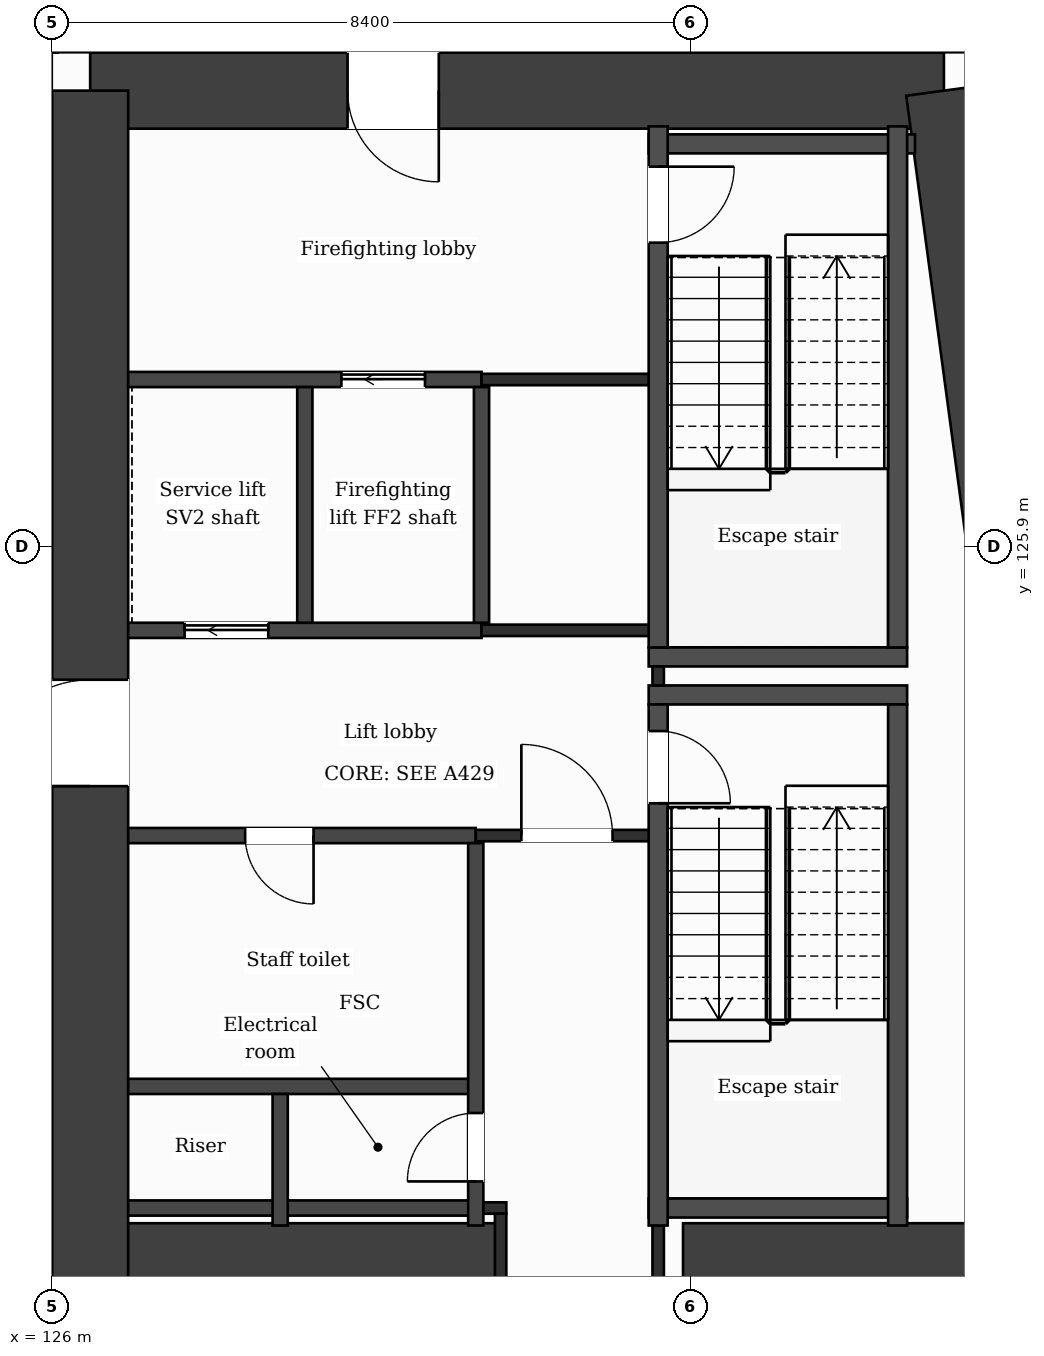
"""IFC4 building model, lengths in metres.
Left out: names, types, materials, properties, quantities, classifications, styles, units other than length and angle.
Written with IfcOpenShell. Run it as: python <this file> out.ifc"""

import sys

from ifc_helpers import new_model, si_unit, direction, frame, frame_2d, origin, place, context, subcontext, project, spatial, rectangle, extrude, element, fill, save


model = new_model("IFC4")
c1 = context("Model", 3, precision=1e-05, world=origin(), true_north=direction((0.0, 1.0)))
c2 = subcontext(c1, "Body", "Model", "MODEL_VIEW")
j1 = project(units=[si_unit("LENGTHUNIT", "METRE"), si_unit("PLANEANGLEUNIT", "RADIAN")], contexts=[c1])
p1 = place(None, origin())
s1 = spatial("IfcSite", under=j1, at=p1, CompositionType="ELEMENT")
p2 = place(p1, origin())
s2 = spatial("IfcBuilding", under=s1, at=p2, CompositionType="ELEMENT")
p3 = place(p2, frame((0.0, 0.0, 120.6)))
s3 = spatial("IfcBuildingStorey", under=s2, at=p3, CompositionType="ELEMENT", Elevation=120.6)
p4 = place(p3, frame((126.5, 131.9, 0.0), z_axis=(0.0, 0.0, 1.0), x_axis=(1.0, 0.0, 0.0)))
e1 = element("IfcWall", 1, at=p4, inside=s3, PredefinedType="SHEAR", context=c2, shape_type="SweptSolid", body=[
    extrude(rectangle(XDim=11.232, YDim=1.0, at=frame_2d((5.616, 0.0))), origin(), (0.0, 0.0, 1.0), 3.7),
])
p5 = place(p4, frame((3.386, 0.0, 0.0)))
e2 = element("IfcOpeningElement", 2, at=p5, cuts=e1, PredefinedType="OPENING", context=c2, shape_type="SweptSolid", body=[
    extrude(rectangle(XDim=1.2, YDim=2.1, at=frame_2d((0.6, 1.05))), frame((0.0, 0.51, 0.0), z_axis=(0.0, -1.0, 0.0), x_axis=(1.0, 0.0, 0.0)), (0.0, 0.0, 1.0), 1.02),
])
p6 = place(p3, frame((137.732, 131.9, 0.0), z_axis=(0.0, 0.0, 1.0), x_axis=(0.133411141623, -0.991060778808, 0.0)))
e3 = element("IfcWall", 3, at=p6, inside=s3, PredefinedType="SHEAR", context=c2, shape_type="SweptSolid", body=[
    extrude(rectangle(XDim=21.189, YDim=1.0, at=frame_2d((10.595, 0.0))), origin(), (0.0, 0.0, 1.0), 3.7),
])
p7 = place(p3, frame((126.5, 110.9, 0.0), z_axis=(0.0, 0.0, 1.0), x_axis=(0.0, 1.0, 0.0)))
e4 = element("IfcWall", 4, at=p7, inside=s3, PredefinedType="SHEAR", context=c2, shape_type="SweptSolid", body=[
    extrude(rectangle(XDim=21.0, YDim=1.0, at=frame_2d((10.5, 0.0))), origin(), (0.0, 0.0, 1.0), 3.7),
])
p8 = place(p7, frame((11.85, 0.0, 0.0)))
e5 = element("IfcOpeningElement", 5, at=p8, cuts=e4, PredefinedType="OPENING", context=c2, shape_type="SweptSolid", body=[
    extrude(rectangle(XDim=1.4, YDim=2.1, at=frame_2d((0.7, 1.05))), frame((0.0, 0.51, 0.0), z_axis=(0.0, -1.0, 0.0), x_axis=(1.0, 0.0, 0.0)), (0.0, 0.0, 1.0), 1.02),
])
p9 = place(p3, frame((127.0, 116.5, 0.0), z_axis=(0.0, 0.0, 1.0), x_axis=(1.0, 0.0, 0.0)))
e6 = element("IfcWall", 6, at=p9, inside=s3, PredefinedType="SHEAR", context=c2, shape_type="SweptSolid", body=[
    extrude(rectangle(XDim=4.9, YDim=1.0, at=frame_2d((2.45, 0.0))), origin(), (0.0, 0.0, 1.0), 3.7),
])
p10 = place(p3, frame((134.3, 116.5, 0.0), z_axis=(0.0, 0.0, 1.0), x_axis=(1.0, 0.0, 0.0)))
e7 = element("IfcWall", 7, at=p10, inside=s3, PredefinedType="SHEAR", context=c2, shape_type="SweptSolid", body=[
    extrude(rectangle(XDim=5.077, YDim=1.0, at=frame_2d((2.539, 0.0))), origin(), (0.0, 0.0, 1.0), 3.7),
])
p11 = place(p3, frame((136.504, 132.4, 0.0), z_axis=(0.0, 0.0, 1.0), x_axis=(-0.133399697462, 0.99106231929, 0.0)))
e8 = element("IfcWall", 8, at=p11, inside=s3, PredefinedType="SOLIDWALL", context=c2, shape_type="SweptSolid", body=[
    extrude(rectangle(XDim=6.74, YDim=0.3, at=frame_2d((3.37, 0.0))), origin(), (0.0, 0.0, 1.0), 3.38),
])
p12 = place(p11, frame((1.115, 0.0, 0.0)))
e9 = element("IfcOpeningElement", 9, at=p12, cuts=e8, PredefinedType="OPENING", context=c2, shape_type="SweptSolid", body=[
    extrude(rectangle(XDim=1.2, YDim=2.4, at=frame_2d((0.6, 1.2))), frame((0.0, 0.16, 0.0), z_axis=(0.0, -1.0, 0.0), x_axis=(1.0, 0.0, 0.0)), (0.0, 0.0, 1.0), 0.32),
])
p13 = place(p11, frame((3.835, 0.0, 0.9)))
e10 = element("IfcOpeningElement", 10, at=p13, cuts=e8, PredefinedType="OPENING", context=c2, shape_type="SweptSolid", body=[
    extrude(rectangle(XDim=2.4, YDim=2.1, at=frame_2d((1.2, 1.05))), frame((0.0, 0.16, 0.0), z_axis=(0.0, -1.0, 0.0), x_axis=(1.0, 0.0, 0.0)), (0.0, 0.0, 1.0), 0.32),
])
p14 = place(p3, frame((127.0, 117.2, 0.0), z_axis=(0.0, 0.0, 1.0), x_axis=(1.0, 0.0, 0.0)))
e11 = element("IfcWall", 11, at=p14, inside=s3, PredefinedType="PARTITIONING", context=c2, shape_type="SweptSolid", body=[
    extrude(rectangle(XDim=4.573, YDim=0.2, at=frame_2d((2.287, 0.0))), origin(), (0.0, 0.0, 1.0), 3.38),
])
p15 = place(p3, frame((131.573, 117.2, 0.0), z_axis=(0.0, 0.0, 1.0), x_axis=(1.0, 0.0, 0.0)))
e12 = element("IfcWall", 12, at=p15, inside=s3, PredefinedType="PARTITIONING", context=c2, shape_type="SweptSolid", body=[
    extrude(rectangle(XDim=0.402, YDim=0.15, at=frame_2d((0.201, 0.0))), origin(), (0.0, 0.0, 1.0), 3.38),
])
p16 = place(p3, frame((133.848, 117.2, 0.0), z_axis=(0.0, 0.0, 1.0), x_axis=(1.0, 0.0, 0.0)))
e13 = element("IfcWall", 13, at=p16, inside=s3, PredefinedType="PARTITIONING", context=c2, shape_type="SweptSolid", body=[
    extrude(rectangle(XDim=3.4, YDim=0.25, at=frame_2d((1.7, 0.0))), origin(), (0.0, 0.0, 1.0), 3.38),
])
p17 = place(p3, frame((127.0, 118.8, 0.0), z_axis=(0.0, 0.0, 1.0), x_axis=(1.0, 0.0, 0.0)))
e14 = element("IfcWall", 14, at=p17, inside=s3, PredefinedType="PARTITIONING", context=c2, shape_type="SweptSolid", body=[
    extrude(rectangle(XDim=4.573, YDim=0.2, at=frame_2d((2.287, 0.0))), origin(), (0.0, 0.0, 1.0), 3.38),
])
p18 = place(p3, frame((127.0, 122.1, 0.0), z_axis=(0.0, 0.0, 1.0), x_axis=(1.0, 0.0, 0.0)))
e15 = element("IfcWall", 15, at=p18, inside=s3, PredefinedType="PARTITIONING", context=c2, shape_type="SweptSolid", body=[
    extrude(rectangle(XDim=4.573, YDim=0.2, at=frame_2d((2.287, 0.0))), origin(), (0.0, 0.0, 1.0), 3.38),
])
p19 = place(p18, frame((1.539, 0.0, 0.0)))
e16 = element("IfcOpeningElement", 16, at=p19, cuts=e15, PredefinedType="OPENING", context=c2, shape_type="SweptSolid", body=[
    extrude(rectangle(XDim=0.9, YDim=2.1, at=frame_2d((0.45, 1.05))), frame((0.0, 0.11, 0.0), z_axis=(0.0, -1.0, 0.0), x_axis=(1.0, 0.0, 0.0)), (0.0, 0.0, 1.0), 0.22),
])
p20 = place(p3, frame((131.573, 122.1, 0.0), z_axis=(0.0, 0.0, 1.0), x_axis=(1.0, 0.0, 0.0)))
e17 = element("IfcWall", 17, at=p20, inside=s3, PredefinedType="PARTITIONING", context=c2, shape_type="SweptSolid", body=[
    extrude(rectangle(XDim=2.4, YDim=0.15, at=frame_2d((1.2, 0.0))), origin(), (0.0, 0.0, 1.0), 3.38),
])
p21 = place(p20, frame((0.6, 0.0, 0.0)))
e18 = element("IfcOpeningElement", 18, at=p21, cuts=e17, PredefinedType="OPENING", context=c2, shape_type="SweptSolid", body=[
    extrude(rectangle(XDim=1.2, YDim=2.1, at=frame_2d((0.6, 1.05))), frame((0.0, 0.085, 0.0), z_axis=(0.0, -1.0, 0.0), x_axis=(1.0, 0.0, 0.0)), (0.0, 0.0, 1.0), 0.17),
])
p22 = place(p3, frame((100.8, 122.45, 0.0), z_axis=(0.0, 0.0, 1.0), x_axis=(1.0, 0.0, 0.0)))
e19 = element("IfcWall", 19, at=p22, inside=s3, PredefinedType="PARTITIONING", context=c2, shape_type="SweptSolid", body=[
    extrude(rectangle(XDim=25.2, YDim=0.15, at=frame_2d((12.6, 0.0))), origin(), (0.0, 0.0, 1.0), 3.38),
])
for number, where, z_axis, x_axis in (
    (20, (133.848, 123.95, 0.0), (0.0, 0.0, 1.0), (1.0, 0.0, 0.0)),
    (21, (133.848, 124.45, 0.0), (0.0, 0.0, 1.0), (1.0, 0.0, 0.0)),
):
    element("IfcWall", number, at=place(p3, frame(where, z_axis=z_axis, x_axis=x_axis)), inside=s3, PredefinedType="PARTITIONING", context=c2, shape_type="SweptSolid", body=[
        extrude(rectangle(XDim=3.4, YDim=0.25, at=frame_2d((1.7, 0.0))), origin(), (0.0, 0.0, 1.0), 3.38),
    ])
p23 = place(p3, frame((100.8, 124.45, 0.0), z_axis=(0.0, 0.0, 1.0), x_axis=(1.0, 0.0, 0.0)))
e22 = element("IfcWall", 22, at=p23, inside=s3, PredefinedType="PARTITIONING", context=c2, shape_type="SweptSolid", body=[
    extrude(rectangle(XDim=25.2, YDim=0.15, at=frame_2d((12.6, 0.0))), origin(), (0.0, 0.0, 1.0), 3.38),
])
p24 = place(p23, frame((1.85, 0.0, 0.0)))
e23 = element("IfcOpeningElement", 23, at=p24, cuts=e22, PredefinedType="OPENING", context=c2, shape_type="SweptSolid", body=[
    extrude(rectangle(XDim=1.0, YDim=2.1, at=frame_2d((0.5, 1.05))), frame((0.0, 0.085, 0.0), z_axis=(0.0, -1.0, 0.0), x_axis=(1.0, 0.0, 0.0)), (0.0, 0.0, 1.0), 0.17),
])
p25 = place(p23, frame((6.425, 0.0, 0.0)))
e24 = element("IfcOpeningElement", 24, at=p25, cuts=e22, PredefinedType="OPENING", context=c2, shape_type="SweptSolid", body=[
    extrude(rectangle(XDim=1.0, YDim=2.1, at=frame_2d((0.5, 1.05))), frame((0.0, 0.085, 0.0), z_axis=(0.0, -1.0, 0.0), x_axis=(1.0, 0.0, 0.0)), (0.0, 0.0, 1.0), 0.17),
])
p26 = place(p23, frame((12.77, 0.0, 0.0)))
e25 = element("IfcOpeningElement", 25, at=p26, cuts=e22, PredefinedType="OPENING", context=c2, shape_type="SweptSolid", body=[
    extrude(rectangle(XDim=1.0, YDim=2.1, at=frame_2d((0.5, 1.05))), frame((0.0, 0.085, 0.0), z_axis=(0.0, -1.0, 0.0), x_axis=(1.0, 0.0, 0.0)), (0.0, 0.0, 1.0), 0.17),
])
p27 = place(p23, frame((17.8, 0.0, 0.0)))
e26 = element("IfcOpeningElement", 26, at=p27, cuts=e22, PredefinedType="OPENING", context=c2, shape_type="SweptSolid", body=[
    extrude(rectangle(XDim=1.0, YDim=2.1, at=frame_2d((0.5, 1.05))), frame((0.0, 0.085, 0.0), z_axis=(0.0, -1.0, 0.0), x_axis=(1.0, 0.0, 0.0)), (0.0, 0.0, 1.0), 0.17),
])
p28 = place(p23, frame((22.85, 0.0, 0.0)))
e27 = element("IfcOpeningElement", 27, at=p28, cuts=e22, PredefinedType="OPENING", context=c2, shape_type="SweptSolid", body=[
    extrude(rectangle(XDim=1.0, YDim=2.1, at=frame_2d((0.5, 1.05))), frame((0.0, 0.085, 0.0), z_axis=(0.0, -1.0, 0.0), x_axis=(1.0, 0.0, 0.0)), (0.0, 0.0, 1.0), 0.17),
])
p29 = place(p3, frame((127.0, 124.8, 0.0), z_axis=(0.0, 0.0, 1.0), x_axis=(1.0, 0.0, 0.0)))
e28 = element("IfcWall", 28, at=p29, inside=s3, PredefinedType="PARTITIONING", context=c2, shape_type="SweptSolid", body=[
    extrude(rectangle(XDim=4.649, YDim=0.2, at=frame_2d((2.324, 0.0))), origin(), (0.0, 0.0, 1.0), 3.38),
])
p30 = place(p29, frame((0.743, 0.0, 0.0)))
e29 = element("IfcOpeningElement", 29, at=p30, cuts=e28, PredefinedType="OPENING", context=c2, shape_type="SweptSolid", body=[
    extrude(rectangle(XDim=1.1, YDim=2.1, at=frame_2d((0.55, 1.05))), frame((0.0, 0.11, 0.0), z_axis=(0.0, -1.0, 0.0), x_axis=(1.0, 0.0, 0.0)), (0.0, 0.0, 1.0), 0.22),
])
p31 = place(p3, frame((131.649, 124.8, 0.0), z_axis=(0.0, 0.0, 1.0), x_axis=(1.0, 0.0, 0.0)))
e30 = element("IfcWall", 30, at=p31, inside=s3, PredefinedType="PARTITIONING", context=c2, shape_type="SweptSolid", body=[
    extrude(rectangle(XDim=2.449, YDim=0.15, at=frame_2d((1.225, 0.0))), origin(), (0.0, 0.0, 1.0), 3.38),
])
p32 = place(p3, frame((127.0, 128.1, 0.0), z_axis=(0.0, 0.0, 1.0), x_axis=(1.0, 0.0, 0.0)))
e31 = element("IfcWall", 31, at=p32, inside=s3, PredefinedType="PARTITIONING", context=c2, shape_type="SweptSolid", body=[
    extrude(rectangle(XDim=4.649, YDim=0.2, at=frame_2d((2.324, 0.0))), origin(), (0.0, 0.0, 1.0), 3.38),
])
p33 = place(p32, frame((2.805, 0.0, 0.0)))
e32 = element("IfcOpeningElement", 32, at=p33, cuts=e31, PredefinedType="OPENING", context=c2, shape_type="SweptSolid", body=[
    extrude(rectangle(XDim=1.1, YDim=2.1, at=frame_2d((0.55, 1.05))), frame((0.0, 0.11, 0.0), z_axis=(0.0, -1.0, 0.0), x_axis=(1.0, 0.0, 0.0)), (0.0, 0.0, 1.0), 0.22),
])
p34 = place(p3, frame((131.649, 128.1, 0.0), z_axis=(0.0, 0.0, 1.0), x_axis=(1.0, 0.0, 0.0)))
e33 = element("IfcWall", 33, at=p34, inside=s3, PredefinedType="PARTITIONING", context=c2, shape_type="SweptSolid", body=[
    extrude(rectangle(XDim=2.324, YDim=0.15, at=frame_2d((1.162, 0.0))), origin(), (0.0, 0.0, 1.0), 3.38),
])
p35 = place(p3, frame((133.848, 131.2, 0.0), z_axis=(0.0, 0.0, 1.0), x_axis=(1.0, 0.0, 0.0)))
e34 = element("IfcWall", 34, at=p35, inside=s3, PredefinedType="PARTITIONING", context=c2, shape_type="SweptSolid", body=[
    extrude(rectangle(XDim=3.504, YDim=0.25, at=frame_2d((1.752, 0.0))), origin(), (0.0, 0.0, 1.0), 3.38),
])
p36 = place(p3, frame((129.0, 116.97, 0.0), z_axis=(0.0, 0.0, 1.0), x_axis=(0.0, 1.0, 0.0)))
e35 = element("IfcWall", 35, at=p36, inside=s3, PredefinedType="PARTITIONING", context=c2, shape_type="SweptSolid", body=[
    extrude(rectangle(XDim=1.73, YDim=0.2, at=frame_2d((0.865, 0.0))), origin(), (0.0, 0.0, 1.0), 3.38),
])
p37 = place(p3, frame((129.324, 124.9, 0.0), z_axis=(0.0, 0.0, 1.0), x_axis=(0.0, 1.0, 0.0)))
e36 = element("IfcWall", 36, at=p37, inside=s3, PredefinedType="PARTITIONING", context=c2, shape_type="SweptSolid", body=[
    extrude(rectangle(XDim=3.1, YDim=0.2, at=frame_2d((1.55, 0.0))), origin(), (0.0, 0.0, 1.0), 3.38),
])
p38 = place(p3, frame((131.573, 116.97, 0.0), z_axis=(0.0, 0.0, 1.0), x_axis=(0.0, 1.0, 0.0)))
e37 = element("IfcWall", 37, at=p38, inside=s3, PredefinedType="PARTITIONING", context=c2, shape_type="SweptSolid", body=[
    extrude(rectangle(XDim=5.03, YDim=0.2, at=frame_2d((2.515, 0.0))), origin(), (0.0, 0.0, 1.0), 3.38),
])
p39 = place(p38, frame((0.58, 0.0, 0.0)))
e38 = element("IfcOpeningElement", 38, at=p39, cuts=e37, PredefinedType="OPENING", context=c2, shape_type="SweptSolid", body=[
    extrude(rectangle(XDim=0.9, YDim=2.1, at=frame_2d((0.45, 1.05))), frame((0.0, 0.11, 0.0), z_axis=(0.0, -1.0, 0.0), x_axis=(1.0, 0.0, 0.0)), (0.0, 0.0, 1.0), 0.22),
])
p40 = place(p3, frame((131.649, 124.9, 0.0), z_axis=(0.0, 0.0, 1.0), x_axis=(0.0, 1.0, 0.0)))
e39 = element("IfcWall", 39, at=p40, inside=s3, PredefinedType="PARTITIONING", context=c2, shape_type="SweptSolid", body=[
    extrude(rectangle(XDim=3.1, YDim=0.2, at=frame_2d((1.55, 0.0))), origin(), (0.0, 0.0, 1.0), 3.38),
])
p41 = place(p3, frame((131.9, 116.0, 0.0), z_axis=(0.0, 0.0, 1.0), x_axis=(0.0, 1.0, 0.0)))
e40 = element("IfcWall", 40, at=p41, inside=s3, PredefinedType="PARTITIONING", context=c2, shape_type="SweptSolid", body=[
    extrude(rectangle(XDim=1.125, YDim=0.15, at=frame_2d((0.562, 0.0))), origin(), (0.0, 0.0, 1.0), 3.38),
])
p42 = place(p3, frame((133.973, 116.0, 0.0), z_axis=(0.0, 0.0, 1.0), x_axis=(0.0, 1.0, 0.0)))
e41 = element("IfcWall", 41, at=p42, inside=s3, PredefinedType="PARTITIONING", context=c2, shape_type="SweptSolid", body=[
    extrude(rectangle(XDim=0.97, YDim=0.15, at=frame_2d((0.485, 0.0))), origin(), (0.0, 0.0, 1.0), 3.38),
])
p43 = place(p3, frame((133.973, 124.075, 0.0), z_axis=(0.0, 0.0, 1.0), x_axis=(0.0, 1.0, 0.0)))
e42 = element("IfcWall", 42, at=p43, inside=s3, PredefinedType="PARTITIONING", context=c2, shape_type="SweptSolid", body=[
    extrude(rectangle(XDim=0.25, YDim=0.15, at=frame_2d((0.125, 0.0))), origin(), (0.0, 0.0, 1.0), 3.38),
])
p44 = place(p3, frame((133.973, 116.97, 0.0), z_axis=(0.0, 0.0, 1.0), x_axis=(0.0, 1.0, 0.0)))
e43 = element("IfcWall", 43, at=p44, inside=s3, PredefinedType="PARTITIONING", context=c2, shape_type="SweptSolid", body=[
    extrude(rectangle(XDim=6.855, YDim=0.25, at=frame_2d((3.427, 0.0))), origin(), (0.0, 0.0, 1.0), 3.38),
])
p45 = place(p44, frame((5.555, 0.0, 0.0)))
e44 = element("IfcOpeningElement", 44, at=p45, cuts=e43, PredefinedType="OPENING", context=c2, shape_type="SweptSolid", body=[
    extrude(rectangle(XDim=0.95, YDim=2.1, at=frame_2d((0.475, 1.05))), frame((0.0, 0.135, 0.0), z_axis=(0.0, -1.0, 0.0), x_axis=(1.0, 0.0, 0.0)), (0.0, 0.0, 1.0), 0.27),
])
p46 = place(p3, frame((133.973, 124.575, 0.0), z_axis=(0.0, 0.0, 1.0), x_axis=(0.0, 1.0, 0.0)))
e45 = element("IfcWall", 45, at=p46, inside=s3, PredefinedType="PARTITIONING", context=c2, shape_type="SweptSolid", body=[
    extrude(rectangle(XDim=6.855, YDim=0.25, at=frame_2d((3.427, 0.0))), origin(), (0.0, 0.0, 1.0), 3.38),
])
p47 = place(p46, frame((5.325, 0.0, 0.0)))
e46 = element("IfcOpeningElement", 46, at=p47, cuts=e45, PredefinedType="OPENING", context=c2, shape_type="SweptSolid", body=[
    extrude(rectangle(XDim=1.0, YDim=2.1, at=frame_2d((0.5, 1.05))), frame((0.0, 0.135, 0.0), z_axis=(0.0, -1.0, 0.0), x_axis=(1.0, 0.0, 0.0)), (0.0, 0.0, 1.0), 0.27),
])
for number, where, z_axis, x_axis in (
    (47, (137.123, 116.97, 0.0), (0.0, 0.0, 1.0), (0.0, 1.0, 0.0)),
    (48, (137.123, 124.575, 0.0), (0.0, 0.0, 1.0), (0.0, 1.0, 0.0)),
):
    element("IfcWall", number, at=place(p3, frame(where, z_axis=z_axis, x_axis=x_axis)), inside=s3, PredefinedType="PARTITIONING", context=c2, shape_type="SweptSolid", body=[
        extrude(rectangle(XDim=6.855, YDim=0.25, at=frame_2d((3.427, 0.0))), origin(), (0.0, 0.0, 1.0), 3.38),
    ])
p48 = place(p21, origin())
e49 = element("IfcDoor", 49, at=p48, inside=s3, OperationType="SINGLE_SWING_LEFT", PredefinedType="DOOR", context=c2, shape_type="SweptSolid", body=[
    extrude(rectangle(XDim=1.2, YDim=2.1, at=frame_2d((0.6, 1.05))), frame((0.0, 0.025, 0.0), z_axis=(0.0, -1.0, 0.0), x_axis=(1.0, 0.0, 0.0)), (0.0, 0.0, 1.0), 0.05),
])
fill(e18, e49)
p49 = place(p33, origin())
e50 = element("IfcDoor", 50, at=p49, inside=s3, OperationType="SLIDING_TO_LEFT", PredefinedType="DOOR", context=c2, shape_type="SweptSolid", body=[
    extrude(rectangle(XDim=1.1, YDim=2.1, at=frame_2d((0.55, 1.05))), frame((0.0, 0.025, 0.0), z_axis=(0.0, -1.0, 0.0), x_axis=(1.0, 0.0, 0.0)), (0.0, 0.0, 1.0), 0.05),
])
fill(e32, e50)
p50 = place(p30, origin())
e51 = element("IfcDoor", 51, at=p50, inside=s3, OperationType="SLIDING_TO_LEFT", PredefinedType="DOOR", context=c2, shape_type="SweptSolid", body=[
    extrude(rectangle(XDim=1.1, YDim=2.1, at=frame_2d((0.55, 1.05))), frame((0.0, 0.025, 0.0), z_axis=(0.0, -1.0, 0.0), x_axis=(1.0, 0.0, 0.0)), (0.0, 0.0, 1.0), 0.05),
])
fill(e29, e51)
p51 = place(p19, origin())
e52 = element("IfcDoor", 52, at=p51, inside=s3, OperationType="SINGLE_SWING_RIGHT", PredefinedType="DOOR", context=c2, shape_type="SweptSolid", body=[
    extrude(rectangle(XDim=0.9, YDim=2.1, at=frame_2d((0.45, 1.05))), frame((0.0, 0.025, 0.0), z_axis=(0.0, -1.0, 0.0), x_axis=(1.0, 0.0, 0.0)), (0.0, 0.0, 1.0), 0.05),
])
fill(e16, e52)
p52 = place(p45, origin())
e53 = element("IfcDoor", 53, at=p52, inside=s3, OperationType="SINGLE_SWING_LEFT", PredefinedType="DOOR", context=c2, shape_type="SweptSolid", body=[
    extrude(rectangle(XDim=0.95, YDim=2.1, at=frame_2d((0.475, 1.05))), frame((0.0, 0.025, 0.0), z_axis=(0.0, -1.0, 0.0), x_axis=(1.0, 0.0, 0.0)), (0.0, 0.0, 1.0), 0.05),
])
fill(e44, e53)
p53 = place(p47, origin())
e54 = element("IfcDoor", 54, at=p53, inside=s3, OperationType="SINGLE_SWING_RIGHT", PredefinedType="DOOR", context=c2, shape_type="SweptSolid", body=[
    extrude(rectangle(XDim=1.0, YDim=2.1, at=frame_2d((0.5, 1.05))), frame((0.0, 0.025, 0.0), z_axis=(0.0, -1.0, 0.0), x_axis=(1.0, 0.0, 0.0)), (0.0, 0.0, 1.0), 0.05),
])
fill(e46, e54)
p54 = place(p39, origin())
e55 = element("IfcDoor", 55, at=p54, inside=s3, OperationType="SINGLE_SWING_LEFT", PredefinedType="DOOR", context=c2, shape_type="SweptSolid", body=[
    extrude(rectangle(XDim=0.9, YDim=2.1, at=frame_2d((0.45, 1.05))), frame((0.0, 0.025, 0.0), z_axis=(0.0, -1.0, 0.0), x_axis=(1.0, 0.0, 0.0)), (0.0, 0.0, 1.0), 0.05),
])
fill(e38, e55)
p55 = place(p5, origin())
e56 = element("IfcDoor", 56, at=p55, inside=s3, OperationType="SINGLE_SWING_RIGHT", PredefinedType="DOOR", context=c2, shape_type="SweptSolid", body=[
    extrude(rectangle(XDim=1.2, YDim=2.1, at=frame_2d((0.6, 1.05))), frame((0.0, 0.025, 0.0), z_axis=(0.0, -1.0, 0.0), x_axis=(1.0, 0.0, 0.0)), (0.0, 0.0, 1.0), 0.05),
])
fill(e2, e56)
p56 = place(p8, origin())
e57 = element("IfcDoor", 57, at=p56, inside=s3, OperationType="SINGLE_SWING_LEFT", PredefinedType="DOOR", context=c2, shape_type="SweptSolid", body=[
    extrude(rectangle(XDim=1.4, YDim=2.1, at=frame_2d((0.7, 1.05))), frame((0.0, 0.025, 0.0), z_axis=(0.0, -1.0, 0.0), x_axis=(1.0, 0.0, 0.0)), (0.0, 0.0, 1.0), 0.05),
])
fill(e5, e57)
save(model, sys.argv[1])
